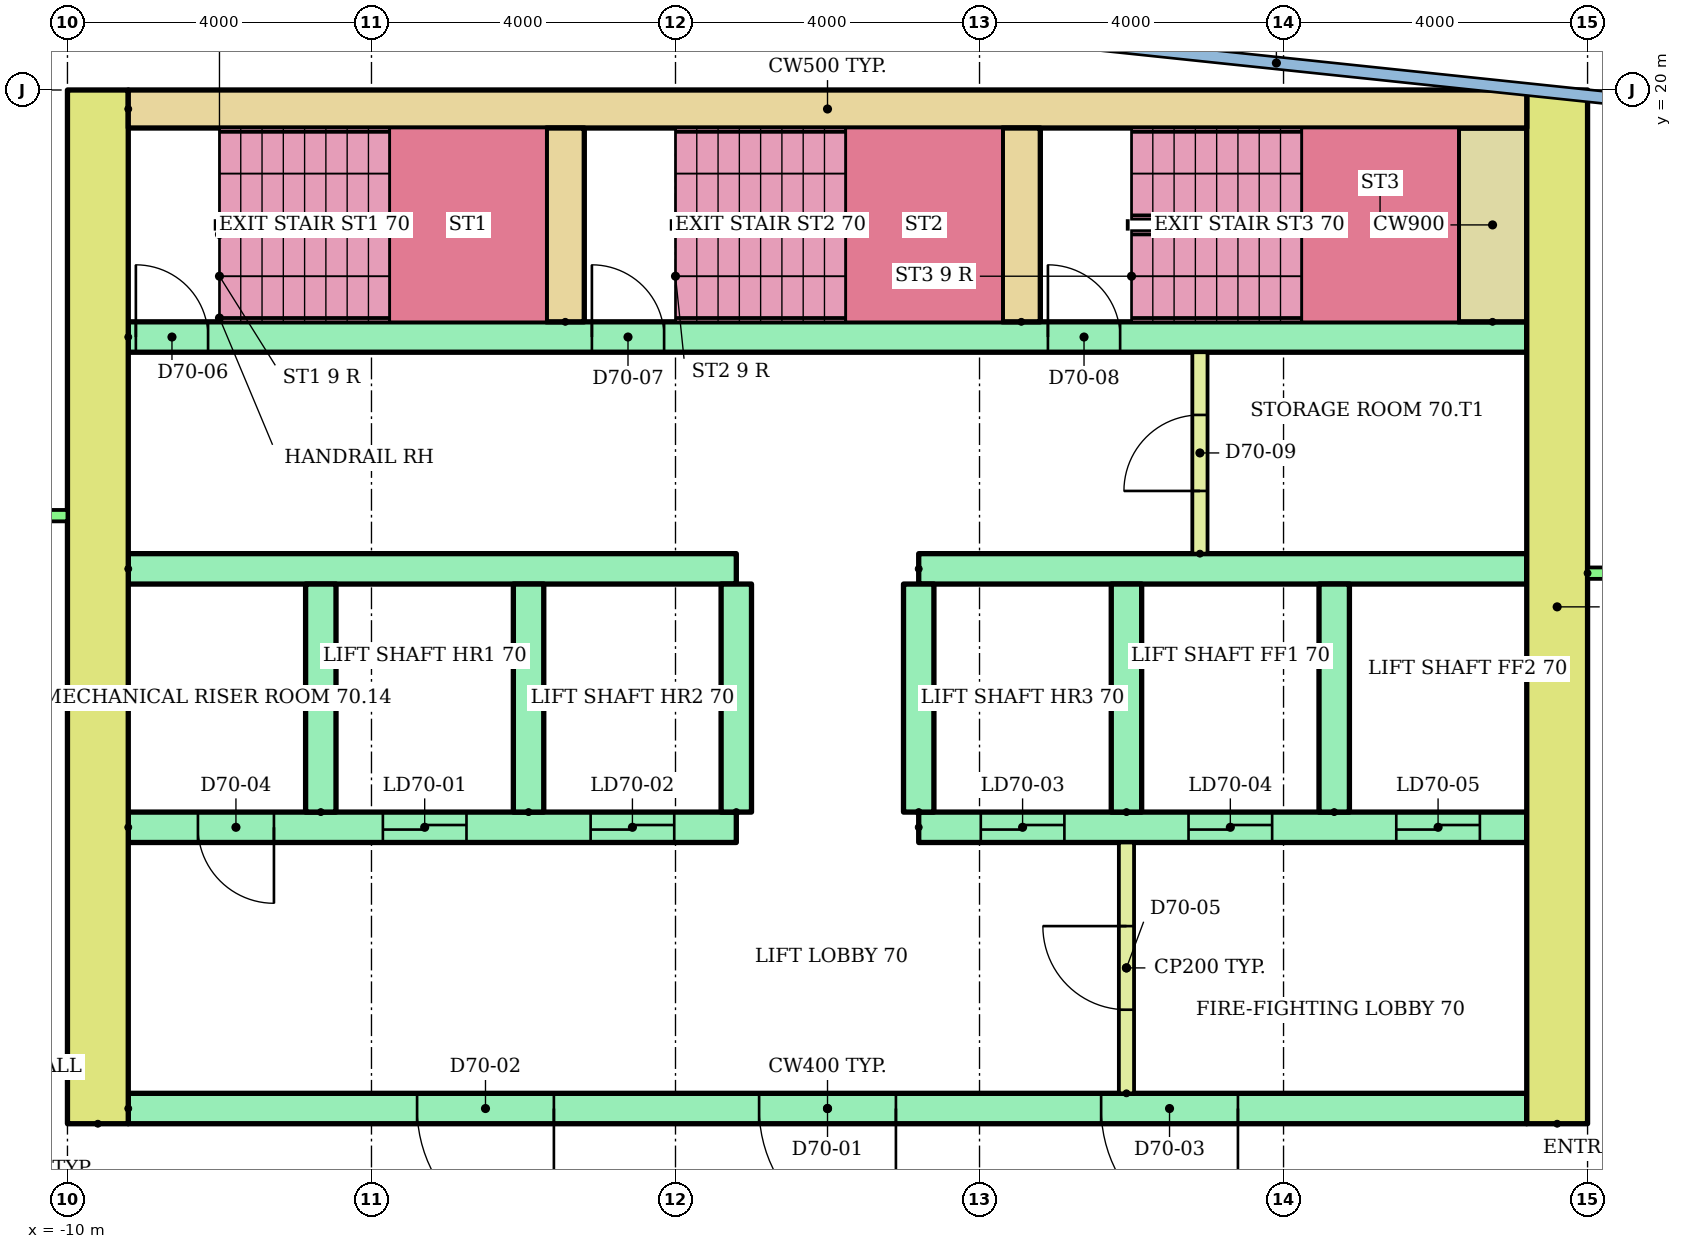
"""IFC4 building model, lengths in metres.
Left out: names, types, materials, properties, quantities, classifications, styles, units other than length and angle.
Written with IfcOpenShell. Run it as: python <this file> out.ifc"""

import sys

from ifc_helpers import new_model, si_unit, direction, frame, frame_2d, origin, place, context, subcontext, project, spatial, rectangle, extrude, element, fill, save


model = new_model("IFC4")
c1 = context("Model", 3, precision=1e-05, world=origin(), true_north=direction((0.0, 1.0)))
c2 = subcontext(c1, "Body", "Model", "MODEL_VIEW")
j1 = project(units=[si_unit("LENGTHUNIT", "METRE"), si_unit("PLANEANGLEUNIT", "RADIAN")], contexts=[c1])
p1 = place(None, origin())
s1 = spatial("IfcSite", under=j1, at=p1, CompositionType="ELEMENT")
p2 = place(p1, origin())
s2 = spatial("IfcBuilding", under=s1, at=p2, CompositionType="ELEMENT")
p3 = place(p2, frame((0.0, 0.0, 269.1)))
s3 = spatial("IfcBuildingStorey", under=s2, at=p3, CompositionType="ELEMENT", Elevation=269.1)
for number, where, z_axis, x_axis in (
    (1, (-9.6, 6.4, 0.0), (0.0, 0.0, 1.0), (0.0, 1.0, 0.0)),
    (2, (9.6, 6.4, 0.0), (0.0, 0.0, 1.0), (0.0, 1.0, 0.0)),
):
    element("IfcWall", number, at=place(p3, frame(where, z_axis=z_axis, x_axis=x_axis)), inside=s3, PredefinedType="SHEAR", context=c2, shape_type="SweptSolid", body=[
        extrude(rectangle(XDim=13.6, YDim=0.8, at=frame_2d((6.8, 0.0))), origin(), (0.0, 0.0, 1.0), 2.92),
    ])
p4 = place(p3, frame((-9.2, 19.75, 0.0)))
e3 = element("IfcWall", 3, at=p4, inside=s3, PredefinedType="SHEAR", context=c2, shape_type="SweptSolid", body=[
    extrude(rectangle(XDim=18.4, YDim=0.5, at=frame_2d((9.2, 0.0))), origin(), (0.0, 0.0, 1.0), 2.92),
])
p5 = place(p3, frame((-9.2, 6.6, 0.0)))
e4 = element("IfcWall", 4, at=p5, inside=s3, PredefinedType="SHEAR", context=c2, shape_type="SweptSolid", body=[
    extrude(rectangle(XDim=18.4, YDim=0.4, at=frame_2d((9.2, 0.0))), origin(), (0.0, 0.0, 1.0), 2.92),
])
p6 = place(p5, frame((8.3, 0.0, 0.0)))
e5 = element("IfcOpeningElement", 5, at=p6, cuts=e4, PredefinedType="OPENING", context=c2, shape_type="SweptSolid", body=[
    extrude(rectangle(XDim=1.8, YDim=2.1, at=frame_2d((0.9, 1.05))), frame((0.0, 0.21, 0.0), z_axis=(0.0, -1.0, 0.0), x_axis=(1.0, 0.0, 0.0)), (0.0, 0.0, 1.0), 0.42),
])
p7 = place(p5, frame((3.8, 0.0, 0.0)))
e6 = element("IfcOpeningElement", 6, at=p7, cuts=e4, PredefinedType="OPENING", context=c2, shape_type="SweptSolid", body=[
    extrude(rectangle(XDim=1.8, YDim=2.1, at=frame_2d((0.9, 1.05))), frame((0.0, 0.21, 0.0), z_axis=(0.0, -1.0, 0.0), x_axis=(1.0, 0.0, 0.0)), (0.0, 0.0, 1.0), 0.42),
])
p8 = place(p5, frame((12.8, 0.0, 0.0)))
e7 = element("IfcOpeningElement", 7, at=p8, cuts=e4, PredefinedType="OPENING", context=c2, shape_type="SweptSolid", body=[
    extrude(rectangle(XDim=1.8, YDim=2.1, at=frame_2d((0.9, 1.05))), frame((0.0, 0.21, 0.0), z_axis=(0.0, -1.0, 0.0), x_axis=(1.0, 0.0, 0.0)), (0.0, 0.0, 1.0), 0.42),
])
p9 = place(p3, frame((-9.2, 10.3, 0.0)))
e8 = element("IfcWall", 8, at=p9, inside=s3, PredefinedType="SHEAR", context=c2, shape_type="SweptSolid", body=[
    extrude(rectangle(XDim=8.0, YDim=0.4, at=frame_2d((4.0, 0.0))), origin(), (0.0, 0.0, 1.0), 2.92),
])
p10 = place(p9, frame((3.35, 0.0, 0.0)))
e9 = element("IfcOpeningElement", 9, at=p10, cuts=e8, PredefinedType="OPENING", context=c2, shape_type="SweptSolid", body=[
    extrude(rectangle(XDim=1.1, YDim=2.1, at=frame_2d((0.55, 1.05))), frame((0.0, 0.21, 0.0), z_axis=(0.0, -1.0, 0.0), x_axis=(1.0, 0.0, 0.0)), (0.0, 0.0, 1.0), 0.42),
])
p11 = place(p9, frame((6.083, 0.0, 0.0)))
e10 = element("IfcOpeningElement", 10, at=p11, cuts=e8, PredefinedType="OPENING", context=c2, shape_type="SweptSolid", body=[
    extrude(rectangle(XDim=1.1, YDim=2.1, at=frame_2d((0.55, 1.05))), frame((0.0, 0.21, 0.0), z_axis=(0.0, -1.0, 0.0), x_axis=(1.0, 0.0, 0.0)), (0.0, 0.0, 1.0), 0.42),
])
p12 = place(p9, frame((0.917, 0.0, 0.0)))
e11 = element("IfcOpeningElement", 11, at=p12, cuts=e8, PredefinedType="OPENING", context=c2, shape_type="SweptSolid", body=[
    extrude(rectangle(XDim=1.0, YDim=2.1, at=frame_2d((0.5, 1.05))), frame((0.0, 0.21, 0.0), z_axis=(0.0, -1.0, 0.0), x_axis=(1.0, 0.0, 0.0)), (0.0, 0.0, 1.0), 0.42),
])
p13 = place(p3, frame((-9.2, 13.7, 0.0)))
e12 = element("IfcWall", 12, at=p13, inside=s3, PredefinedType="SHEAR", context=c2, shape_type="SweptSolid", body=[
    extrude(rectangle(XDim=8.0, YDim=0.4, at=frame_2d((4.0, 0.0))), origin(), (0.0, 0.0, 1.0), 2.92),
])
p14 = place(p3, frame((1.2, 10.3, 0.0)))
e13 = element("IfcWall", 13, at=p14, inside=s3, PredefinedType="SHEAR", context=c2, shape_type="SweptSolid", body=[
    extrude(rectangle(XDim=8.0, YDim=0.4, at=frame_2d((4.0, 0.0))), origin(), (0.0, 0.0, 1.0), 2.92),
])
p15 = place(p14, frame((0.817, 0.0, 0.0)))
e14 = element("IfcOpeningElement", 14, at=p15, cuts=e13, PredefinedType="OPENING", context=c2, shape_type="SweptSolid", body=[
    extrude(rectangle(XDim=1.1, YDim=2.1, at=frame_2d((0.55, 1.05))), frame((0.0, 0.21, 0.0), z_axis=(0.0, -1.0, 0.0), x_axis=(1.0, 0.0, 0.0)), (0.0, 0.0, 1.0), 0.42),
])
p16 = place(p14, frame((3.55, 0.0, 0.0)))
e15 = element("IfcOpeningElement", 15, at=p16, cuts=e13, PredefinedType="OPENING", context=c2, shape_type="SweptSolid", body=[
    extrude(rectangle(XDim=1.1, YDim=2.1, at=frame_2d((0.55, 1.05))), frame((0.0, 0.21, 0.0), z_axis=(0.0, -1.0, 0.0), x_axis=(1.0, 0.0, 0.0)), (0.0, 0.0, 1.0), 0.42),
])
p17 = place(p14, frame((6.283, 0.0, 0.0)))
e16 = element("IfcOpeningElement", 16, at=p17, cuts=e13, PredefinedType="OPENING", context=c2, shape_type="SweptSolid", body=[
    extrude(rectangle(XDim=1.1, YDim=2.1, at=frame_2d((0.55, 1.05))), frame((0.0, 0.21, 0.0), z_axis=(0.0, -1.0, 0.0), x_axis=(1.0, 0.0, 0.0)), (0.0, 0.0, 1.0), 0.42),
])
p18 = place(p3, frame((1.2, 13.7, 0.0)))
e17 = element("IfcWall", 17, at=p18, inside=s3, PredefinedType="SHEAR", context=c2, shape_type="SweptSolid", body=[
    extrude(rectangle(XDim=8.0, YDim=0.4, at=frame_2d((4.0, 0.0))), origin(), (0.0, 0.0, 1.0), 2.92),
])
for number, where, z_axis, x_axis in (
    (18, (-6.667, 10.5, 0.0), (0.0, 0.0, 1.0), (0.0, 1.0, 0.0)),
    (19, (-3.933, 10.5, 0.0), (0.0, 0.0, 1.0), (0.0, 1.0, 0.0)),
    (20, (-1.2, 10.5, 0.0), (0.0, 0.0, 1.0), (0.0, 1.0, 0.0)),
    (21, (1.2, 10.5, 0.0), (0.0, 0.0, 1.0), (0.0, 1.0, 0.0)),
    (22, (3.933, 10.5, 0.0), (0.0, 0.0, 1.0), (0.0, 1.0, 0.0)),
    (23, (6.667, 10.5, 0.0), (0.0, 0.0, 1.0), (0.0, 1.0, 0.0)),
):
    element("IfcWall", number, at=place(p3, frame(where, z_axis=z_axis, x_axis=x_axis)), inside=s3, PredefinedType="SHEAR", context=c2, shape_type="SweptSolid", body=[
        extrude(rectangle(XDim=3.0, YDim=0.4, at=frame_2d((1.5, 0.0))), origin(), (0.0, 0.0, 1.0), 2.92),
    ])
p19 = place(p3, frame((3.933, 6.8, 0.0), z_axis=(0.0, 0.0, 1.0), x_axis=(0.0, 1.0, 0.0)))
e24 = element("IfcWall", 24, at=p19, inside=s3, PredefinedType="PARTITIONING", context=c2, shape_type="SweptSolid", body=[
    extrude(rectangle(XDim=3.3, YDim=0.2, at=frame_2d((1.65, 0.0))), origin(), (0.0, 0.0, 1.0), 2.92),
])
p20 = place(p19, frame((1.1, 0.0, 0.0)))
e25 = element("IfcOpeningElement", 25, at=p20, cuts=e24, PredefinedType="OPENING", context=c2, shape_type="SweptSolid", body=[
    extrude(rectangle(XDim=1.1, YDim=2.1, at=frame_2d((0.55, 1.05))), frame((0.0, 0.11, 0.0), z_axis=(0.0, -1.0, 0.0), x_axis=(1.0, 0.0, 0.0)), (0.0, 0.0, 1.0), 0.22),
])
p21 = place(p3, frame((-9.2, 16.75, 0.0)))
e26 = element("IfcWall", 26, at=p21, inside=s3, PredefinedType="SHEAR", context=c2, shape_type="SweptSolid", body=[
    extrude(rectangle(XDim=18.4, YDim=0.4, at=frame_2d((9.2, 0.0))), origin(), (0.0, 0.0, 1.0), 2.92),
])
p22 = place(p21, frame((0.1, 0.0, 0.0)))
e27 = element("IfcOpeningElement", 27, at=p22, cuts=e26, PredefinedType="OPENING", context=c2, shape_type="SweptSolid", body=[
    extrude(rectangle(XDim=0.95, YDim=2.1, at=frame_2d((0.475, 1.05))), frame((0.0, 0.21, 0.0), z_axis=(0.0, -1.0, 0.0), x_axis=(1.0, 0.0, 0.0)), (0.0, 0.0, 1.0), 0.42),
])
p23 = place(p21, frame((6.1, 0.0, 0.0)))
e28 = element("IfcOpeningElement", 28, at=p23, cuts=e26, PredefinedType="OPENING", context=c2, shape_type="SweptSolid", body=[
    extrude(rectangle(XDim=0.95, YDim=2.1, at=frame_2d((0.475, 1.05))), frame((0.0, 0.21, 0.0), z_axis=(0.0, -1.0, 0.0), x_axis=(1.0, 0.0, 0.0)), (0.0, 0.0, 1.0), 0.42),
])
p24 = place(p21, frame((12.1, 0.0, 0.0)))
e29 = element("IfcOpeningElement", 29, at=p24, cuts=e26, PredefinedType="OPENING", context=c2, shape_type="SweptSolid", body=[
    extrude(rectangle(XDim=0.95, YDim=2.1, at=frame_2d((0.475, 1.05))), frame((0.0, 0.21, 0.0), z_axis=(0.0, -1.0, 0.0), x_axis=(1.0, 0.0, 0.0)), (0.0, 0.0, 1.0), 0.42),
])
for number, where, z_axis, x_axis in (
    (30, (-3.45, 16.95, 0.0), (0.0, 0.0, 1.0), (0.0, 1.0, 0.0)),
    (31, (2.55, 16.95, 0.0), (0.0, 0.0, 1.0), (0.0, 1.0, 0.0)),
):
    element("IfcWall", number, at=place(p3, frame(where, z_axis=z_axis, x_axis=x_axis)), inside=s3, PredefinedType="SHEAR", context=c2, shape_type="SweptSolid", body=[
        extrude(rectangle(XDim=2.55, YDim=0.5, at=frame_2d((1.275, 0.0))), origin(), (0.0, 0.0, 1.0), 2.92),
    ])
p25 = place(p3, frame((8.75, 16.95, 0.0), z_axis=(0.0, 0.0, 1.0), x_axis=(0.0, 1.0, 0.0)))
e32 = element("IfcWall", 32, at=p25, inside=s3, PredefinedType="SHEAR", context=c2, shape_type="SweptSolid", body=[
    extrude(rectangle(XDim=2.55, YDim=0.9, at=frame_2d((1.275, 0.0))), origin(), (0.0, 0.0, 1.0), 2.92),
])
p26 = place(p3, frame((4.9, 13.9, 0.0), z_axis=(0.0, 0.0, 1.0), x_axis=(0.0, 1.0, 0.0)))
e33 = element("IfcWall", 33, at=p26, inside=s3, PredefinedType="PARTITIONING", context=c2, shape_type="SweptSolid", body=[
    extrude(rectangle(XDim=2.65, YDim=0.2, at=frame_2d((1.325, 0.0))), origin(), (0.0, 0.0, 1.0), 2.92),
])
p27 = place(p26, frame((0.825, 0.0, 0.0)))
e34 = element("IfcOpeningElement", 34, at=p27, cuts=e33, PredefinedType="OPENING", context=c2, shape_type="SweptSolid", body=[
    extrude(rectangle(XDim=1.0, YDim=2.1, at=frame_2d((0.5, 1.05))), frame((0.0, 0.11, 0.0), z_axis=(0.0, -1.0, 0.0), x_axis=(1.0, 0.0, 0.0)), (0.0, 0.0, 1.0), 0.22),
])
p28 = place(p3, frame((-21.89, 14.4, 0.0)))
e35 = element("IfcWall", 35, at=p28, inside=s3, PredefinedType="PARTITIONING", context=c2, shape_type="SweptSolid", body=[
    extrude(rectangle(XDim=11.89, YDim=0.15, at=frame_2d((5.945, 0.0))), origin(), (0.0, 0.0, 1.0), 2.4),
])
p29 = place(p28, frame((1.26, 0.0, 0.0)))
e36 = element("IfcOpeningElement", 36, at=p29, cuts=e35, PredefinedType="OPENING", context=c2, shape_type="SweptSolid", body=[
    extrude(rectangle(XDim=1.0, YDim=2.1, at=frame_2d((0.5, 1.05))), frame((0.0, 0.085, 0.0), z_axis=(0.0, -1.0, 0.0), x_axis=(1.0, 0.0, 0.0)), (0.0, 0.0, 1.0), 0.17),
])
p30 = place(p28, frame((8.304, 0.0, 0.0)))
e37 = element("IfcOpeningElement", 37, at=p30, cuts=e35, PredefinedType="OPENING", context=c2, shape_type="SweptSolid", body=[
    extrude(rectangle(XDim=0.9, YDim=2.1, at=frame_2d((0.45, 1.05))), frame((0.0, 0.085, 0.0), z_axis=(0.0, -1.0, 0.0), x_axis=(1.0, 0.0, 0.0)), (0.0, 0.0, 1.0), 0.17),
])
p31 = place(p3, frame((10.0, 13.643, 0.0)))
e38 = element("IfcWall", 38, at=p31, inside=s3, PredefinedType="PARTITIONING", context=c2, shape_type="SweptSolid", body=[
    extrude(rectangle(XDim=20.641, YDim=0.15, at=frame_2d((10.32, 0.0))), origin(), (0.0, 0.0, 1.0), 2.4),
])
p32 = place(p31, frame((3.42, 0.0, 0.0)))
e39 = element("IfcOpeningElement", 39, at=p32, cuts=e38, PredefinedType="OPENING", context=c2, shape_type="SweptSolid", body=[
    extrude(rectangle(XDim=1.0, YDim=2.1, at=frame_2d((0.5, 1.05))), frame((0.0, 0.085, 0.0), z_axis=(0.0, -1.0, 0.0), x_axis=(1.0, 0.0, 0.0)), (0.0, 0.0, 1.0), 0.17),
])
p33 = place(p31, frame((11.368, 0.0, 0.0)))
e40 = element("IfcOpeningElement", 40, at=p33, cuts=e38, PredefinedType="OPENING", context=c2, shape_type="SweptSolid", body=[
    extrude(rectangle(XDim=0.9, YDim=2.1, at=frame_2d((0.45, 1.05))), frame((0.0, 0.085, 0.0), z_axis=(0.0, -1.0, 0.0), x_axis=(1.0, 0.0, 0.0)), (0.0, 0.0, 1.0), 0.17),
])
p34 = place(p31, frame((18.477, 0.0, 0.0)))
e41 = element("IfcOpeningElement", 41, at=p34, cuts=e38, PredefinedType="OPENING", context=c2, shape_type="SweptSolid", body=[
    extrude(rectangle(XDim=0.9, YDim=2.1, at=frame_2d((0.45, 1.05))), frame((0.0, 0.085, 0.0), z_axis=(0.0, -1.0, 0.0), x_axis=(1.0, 0.0, 0.0)), (0.0, 0.0, 1.0), 0.17),
])
p35 = place(p6, frame((1.8, 0.0, 0.0), z_axis=(0.0, 0.0, 1.0), x_axis=(-1.0, 0.0, 0.0)))
e42 = element("IfcDoor", 42, at=p35, inside=s3, OperationType="DOUBLE_DOOR_SINGLE_SWING", PredefinedType="DOOR", context=c2, shape_type="SweptSolid", body=[
    extrude(rectangle(XDim=1.8, YDim=2.1, at=frame_2d((0.9, 1.05))), frame((0.0, 0.025, 0.0), z_axis=(0.0, -1.0, 0.0), x_axis=(1.0, 0.0, 0.0)), (0.0, 0.0, 1.0), 0.05),
])
fill(e5, e42)
p36 = place(p7, frame((1.8, 0.0, 0.0), z_axis=(0.0, 0.0, 1.0), x_axis=(-1.0, 0.0, 0.0)))
e43 = element("IfcDoor", 43, at=p36, inside=s3, OperationType="DOUBLE_DOOR_SINGLE_SWING", PredefinedType="DOOR", context=c2, shape_type="SweptSolid", body=[
    extrude(rectangle(XDim=1.8, YDim=2.1, at=frame_2d((0.9, 1.05))), frame((0.0, 0.025, 0.0), z_axis=(0.0, -1.0, 0.0), x_axis=(1.0, 0.0, 0.0)), (0.0, 0.0, 1.0), 0.05),
])
fill(e6, e43)
p37 = place(p8, frame((1.8, 0.0, 0.0), z_axis=(0.0, 0.0, 1.0), x_axis=(-1.0, 0.0, 0.0)))
e44 = element("IfcDoor", 44, at=p37, inside=s3, OperationType="DOUBLE_DOOR_SINGLE_SWING", PredefinedType="DOOR", context=c2, shape_type="SweptSolid", body=[
    extrude(rectangle(XDim=1.8, YDim=2.1, at=frame_2d((0.9, 1.05))), frame((0.0, 0.025, 0.0), z_axis=(0.0, -1.0, 0.0), x_axis=(1.0, 0.0, 0.0)), (0.0, 0.0, 1.0), 0.05),
])
fill(e7, e44)
p38 = place(p10, origin())
e45 = element("IfcDoor", 45, at=p38, inside=s3, OperationType="SLIDING_TO_LEFT", PredefinedType="DOOR", context=c2, shape_type="SweptSolid", body=[
    extrude(rectangle(XDim=1.1, YDim=2.1, at=frame_2d((0.55, 1.05))), frame((0.0, 0.025, 0.0), z_axis=(0.0, -1.0, 0.0), x_axis=(1.0, 0.0, 0.0)), (0.0, 0.0, 1.0), 0.05),
])
fill(e9, e45)
p39 = place(p11, origin())
e46 = element("IfcDoor", 46, at=p39, inside=s3, OperationType="SLIDING_TO_LEFT", PredefinedType="DOOR", context=c2, shape_type="SweptSolid", body=[
    extrude(rectangle(XDim=1.1, YDim=2.1, at=frame_2d((0.55, 1.05))), frame((0.0, 0.025, 0.0), z_axis=(0.0, -1.0, 0.0), x_axis=(1.0, 0.0, 0.0)), (0.0, 0.0, 1.0), 0.05),
])
fill(e10, e46)
p40 = place(p15, origin())
e47 = element("IfcDoor", 47, at=p40, inside=s3, OperationType="SLIDING_TO_LEFT", PredefinedType="DOOR", context=c2, shape_type="SweptSolid", body=[
    extrude(rectangle(XDim=1.1, YDim=2.1, at=frame_2d((0.55, 1.05))), frame((0.0, 0.025, 0.0), z_axis=(0.0, -1.0, 0.0), x_axis=(1.0, 0.0, 0.0)), (0.0, 0.0, 1.0), 0.05),
])
fill(e14, e47)
p41 = place(p16, origin())
e48 = element("IfcDoor", 48, at=p41, inside=s3, OperationType="SLIDING_TO_LEFT", PredefinedType="DOOR", context=c2, shape_type="SweptSolid", body=[
    extrude(rectangle(XDim=1.1, YDim=2.1, at=frame_2d((0.55, 1.05))), frame((0.0, 0.025, 0.0), z_axis=(0.0, -1.0, 0.0), x_axis=(1.0, 0.0, 0.0)), (0.0, 0.0, 1.0), 0.05),
])
fill(e15, e48)
p42 = place(p17, origin())
e49 = element("IfcDoor", 49, at=p42, inside=s3, OperationType="SLIDING_TO_LEFT", PredefinedType="DOOR", context=c2, shape_type="SweptSolid", body=[
    extrude(rectangle(XDim=1.1, YDim=2.1, at=frame_2d((0.55, 1.05))), frame((0.0, 0.025, 0.0), z_axis=(0.0, -1.0, 0.0), x_axis=(1.0, 0.0, 0.0)), (0.0, 0.0, 1.0), 0.05),
])
fill(e16, e49)
p43 = place(p12, frame((1.0, 0.0, 0.0), z_axis=(0.0, 0.0, 1.0), x_axis=(-1.0, 0.0, 0.0)))
e50 = element("IfcDoor", 50, at=p43, inside=s3, OperationType="SINGLE_SWING_RIGHT", PredefinedType="DOOR", context=c2, shape_type="SweptSolid", body=[
    extrude(rectangle(XDim=1.0, YDim=2.1, at=frame_2d((0.5, 1.05))), frame((0.0, 0.025, 0.0), z_axis=(0.0, -1.0, 0.0), x_axis=(1.0, 0.0, 0.0)), (0.0, 0.0, 1.0), 0.05),
])
fill(e11, e50)
p44 = place(p20, origin())
e51 = element("IfcDoor", 51, at=p44, inside=s3, OperationType="SINGLE_SWING_RIGHT", PredefinedType="DOOR", context=c2, shape_type="SweptSolid", body=[
    extrude(rectangle(XDim=1.1, YDim=2.1, at=frame_2d((0.55, 1.05))), frame((0.0, 0.025, 0.0), z_axis=(0.0, -1.0, 0.0), x_axis=(1.0, 0.0, 0.0)), (0.0, 0.0, 1.0), 0.05),
])
fill(e25, e51)
p45 = place(p22, origin())
e52 = element("IfcDoor", 52, at=p45, inside=s3, OperationType="SINGLE_SWING_LEFT", PredefinedType="DOOR", context=c2, shape_type="SweptSolid", body=[
    extrude(rectangle(XDim=0.95, YDim=2.1, at=frame_2d((0.475, 1.05))), frame((0.0, 0.025, 0.0), z_axis=(0.0, -1.0, 0.0), x_axis=(1.0, 0.0, 0.0)), (0.0, 0.0, 1.0), 0.05),
])
fill(e27, e52)
p46 = place(p23, origin())
e53 = element("IfcDoor", 53, at=p46, inside=s3, OperationType="SINGLE_SWING_LEFT", PredefinedType="DOOR", context=c2, shape_type="SweptSolid", body=[
    extrude(rectangle(XDim=0.95, YDim=2.1, at=frame_2d((0.475, 1.05))), frame((0.0, 0.025, 0.0), z_axis=(0.0, -1.0, 0.0), x_axis=(1.0, 0.0, 0.0)), (0.0, 0.0, 1.0), 0.05),
])
fill(e28, e53)
p47 = place(p24, origin())
e54 = element("IfcDoor", 54, at=p47, inside=s3, OperationType="SINGLE_SWING_LEFT", PredefinedType="DOOR", context=c2, shape_type="SweptSolid", body=[
    extrude(rectangle(XDim=0.95, YDim=2.1, at=frame_2d((0.475, 1.05))), frame((0.0, 0.025, 0.0), z_axis=(0.0, -1.0, 0.0), x_axis=(1.0, 0.0, 0.0)), (0.0, 0.0, 1.0), 0.05),
])
fill(e29, e54)
p48 = place(p27, origin())
e55 = element("IfcDoor", 55, at=p48, inside=s3, OperationType="SINGLE_SWING_LEFT", PredefinedType="DOOR", context=c2, shape_type="SweptSolid", body=[
    extrude(rectangle(XDim=1.0, YDim=2.1, at=frame_2d((0.5, 1.05))), frame((0.0, 0.025, 0.0), z_axis=(0.0, -1.0, 0.0), x_axis=(1.0, 0.0, 0.0)), (0.0, 0.0, 1.0), 0.05),
])
fill(e34, e55)
save(model, sys.argv[1])
